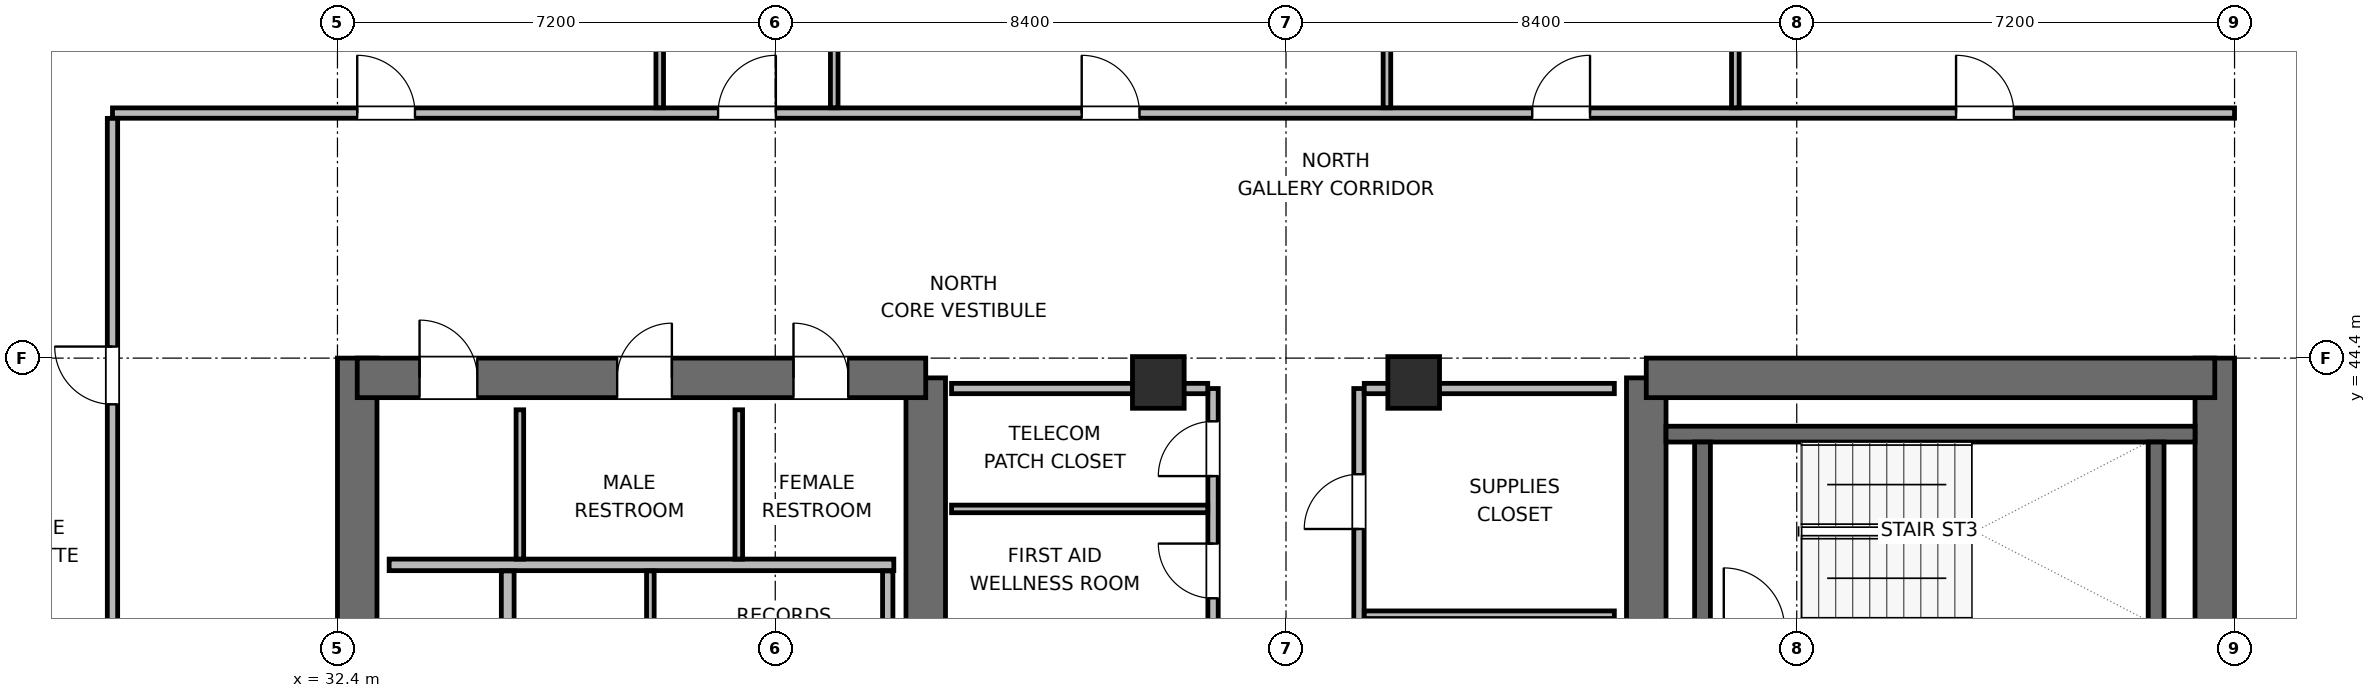
"""IFC4 building model, lengths in metres.
Left out: names, types, materials, properties, quantities, classifications, styles, units other than length and angle.
Written with IfcOpenShell. Run it as: python <this file> out.ifc"""

import sys

from ifc_helpers import new_model, si_unit, direction, frame, frame_2d, origin, origin_2d, place, context, subcontext, project, spatial, rectangle, extrude, element, fill, save


model = new_model("IFC4")
c1 = context("Model", 3, precision=1e-05, world=origin(), true_north=direction((0.0, 1.0)))
c2 = subcontext(c1, "Body", "Model", "MODEL_VIEW")
j1 = project(units=[si_unit("LENGTHUNIT", "METRE"), si_unit("PLANEANGLEUNIT", "RADIAN")], contexts=[c1])
p1 = place(None, origin())
s1 = spatial("IfcSite", under=j1, at=p1, CompositionType="ELEMENT")
p2 = place(p1, origin())
s2 = spatial("IfcBuilding", under=s1, at=p2, CompositionType="ELEMENT")
p3 = place(p2, frame((0.0, 0.0, 223.2)))
s3 = spatial("IfcBuildingStorey", under=s2, at=p3, CompositionType="ELEMENT", Elevation=223.2)
p4 = place(p3, frame((32.725, 27.6, 0.0), z_axis=(0.0, 0.0, 1.0), x_axis=(0.0, 1.0, 0.0)))
e1 = element("IfcWall", 1, at=p4, inside=s3, PredefinedType="SHEAR", context=c2, shape_type="SweptSolid", body=[
    extrude(rectangle(XDim=16.8, YDim=0.65, at=frame_2d((8.4, 0.0))), origin(), (0.0, 0.0, 1.0), 3.9),
])
p5 = place(p3, frame((42.075, 37.8, 0.0), z_axis=(0.0, 0.0, 1.0), x_axis=(0.0, 1.0, 0.0)))
e2 = element("IfcWall", 2, at=p5, inside=s3, PredefinedType="SHEAR", context=c2, shape_type="SweptSolid", body=[
    extrude(rectangle(XDim=6.275, YDim=0.65, at=frame_2d((3.137, 0.0))), origin(), (0.0, 0.0, 1.0), 3.9),
])
p6 = place(p3, frame((32.725, 44.075, 0.0), z_axis=(0.0, 0.0, 1.0), x_axis=(1.0, 0.0, 0.0)))
e3 = element("IfcWall", 3, at=p6, inside=s3, PredefinedType="SHEAR", context=c2, shape_type="SweptSolid", body=[
    extrude(rectangle(XDim=9.35, YDim=0.65, at=frame_2d((4.675, 0.0))), origin(), (0.0, 0.0, 1.0), 3.9),
])
p7 = place(p6, frame((1.025, 0.0, 0.0)))
e4 = element("IfcOpeningElement", 4, at=p7, cuts=e3, PredefinedType="OPENING", context=c2, shape_type="SweptSolid", body=[
    extrude(rectangle(XDim=0.95, YDim=2.04, at=frame_2d((0.475, 1.02))), frame((0.0, 0.335, 0.0), z_axis=(0.0, -1.0, 0.0), x_axis=(1.0, 0.0, 0.0)), (0.0, 0.0, 1.0), 0.67),
])
p8 = place(p6, frame((4.275, 0.0, 0.0)))
e5 = element("IfcOpeningElement", 5, at=p8, cuts=e3, PredefinedType="OPENING", context=c2, shape_type="SweptSolid", body=[
    extrude(rectangle(XDim=0.9, YDim=2.02, at=frame_2d((0.45, 1.01))), frame((0.0, 0.335, 0.0), z_axis=(0.0, -1.0, 0.0), x_axis=(1.0, 0.0, 0.0)), (0.0, 0.0, 1.0), 0.67),
])
p9 = place(p6, frame((7.175, 0.0, 0.0)))
e6 = element("IfcOpeningElement", 6, at=p9, cuts=e3, PredefinedType="OPENING", context=c2, shape_type="SweptSolid", body=[
    extrude(rectangle(XDim=0.9, YDim=2.02, at=frame_2d((0.45, 1.01))), frame((0.0, 0.335, 0.0), z_axis=(0.0, -1.0, 0.0), x_axis=(1.0, 0.0, 0.0)), (0.0, 0.0, 1.0), 0.67),
])
p10 = place(p3, frame((53.925, 38.0, 0.0), z_axis=(0.0, 0.0, 1.0), x_axis=(0.0, 1.0, 0.0)))
e7 = element("IfcWall", 7, at=p10, inside=s3, PredefinedType="SHEAR", context=c2, shape_type="SweptSolid", body=[
    extrude(rectangle(XDim=6.075, YDim=0.65, at=frame_2d((3.038, 0.0))), origin(), (0.0, 0.0, 1.0), 3.9),
])
p11 = place(p3, frame((63.275, 27.6, 0.0), z_axis=(0.0, 0.0, 1.0), x_axis=(0.0, 1.0, 0.0)))
e8 = element("IfcWall", 8, at=p11, inside=s3, PredefinedType="SHEAR", context=c2, shape_type="SweptSolid", body=[
    extrude(rectangle(XDim=16.8, YDim=0.65, at=frame_2d((8.4, 0.0))), origin(), (0.0, 0.0, 1.0), 3.9),
])
p12 = place(p3, frame((53.925, 44.075, 0.0), z_axis=(0.0, 0.0, 1.0), x_axis=(1.0, 0.0, 0.0)))
e9 = element("IfcWall", 9, at=p12, inside=s3, PredefinedType="SHEAR", context=c2, shape_type="SweptSolid", body=[
    extrude(rectangle(XDim=9.35, YDim=0.65, at=frame_2d((4.675, 0.0))), origin(), (0.0, 0.0, 1.0), 3.9),
])
p13 = place(p3, frame((54.25, 43.15, 0.0), z_axis=(0.0, 0.0, 1.0), x_axis=(1.0, 0.0, 0.0)))
e10 = element("IfcWall", 10, at=p13, inside=s3, PredefinedType="SHEAR", context=c2, shape_type="SweptSolid", body=[
    extrude(rectangle(XDim=8.7, YDim=0.26, at=frame_2d((4.35, 0.0))), origin(), (0.0, 0.0, 1.0), 3.9),
])
for number, where, z_axis, x_axis in (
    (11, (54.85, 40.08, 0.0), (0.0, 0.0, 1.0), (0.0, 1.0, 0.0)),
    (12, (62.31, 40.08, 0.0), (0.0, 0.0, 1.0), (0.0, 1.0, 0.0)),
):
    element("IfcWall", number, at=place(p3, frame(where, z_axis=z_axis, x_axis=x_axis)), inside=s3, PredefinedType="SHEAR", context=c2, shape_type="SweptSolid", body=[
        extrude(rectangle(XDim=2.94, YDim=0.26, at=frame_2d((1.47, 0.0))), origin(), (0.0, 0.0, 1.0), 3.9),
    ])
for number, where, z_axis, x_axis in (
    (13, (45.9, 44.0, 0.0), (0.0, 0.0, 1.0), (1.0, 0.0, 0.0)),
    (14, (50.1, 44.0, 0.0), (0.0, 0.0, 1.0), (1.0, 0.0, 0.0)),
):
    element("IfcColumn", number, at=place(p3, frame(where, z_axis=z_axis, x_axis=x_axis)), inside=s3, PredefinedType="COLUMN", context=c2, shape_type="SweptSolid", body=[
        extrude(rectangle(XDim=0.85, YDim=0.85, at=origin_2d()), origin(), (0.0, 0.0, 1.0), 3.9),
    ])
p14 = place(p3, frame((33.25, 41.0, 0.0), z_axis=(0.0, 0.0, 1.0), x_axis=(1.0, 0.0, 0.0)))
e15 = element("IfcWall", 15, at=p14, inside=s3, PredefinedType="PLUMBINGWALL", context=c2, shape_type="SweptSolid", body=[
    extrude(rectangle(XDim=8.3, YDim=0.19, at=frame_2d((4.15, 0.0))), origin(), (0.0, 0.0, 1.0), 3.68),
])
for number, where, z_axis, x_axis in (
    (16, (35.4, 41.095, 0.0), (0.0, 0.0, 1.0), (0.0, 1.0, 0.0)),
    (17, (39.0, 41.095, 0.0), (0.0, 0.0, 1.0), (0.0, 1.0, 0.0)),
):
    element("IfcWall", number, at=place(p3, frame(where, z_axis=z_axis, x_axis=x_axis)), inside=s3, PredefinedType="PARTITIONING", context=c2, shape_type="SweptSolid", body=[
        extrude(rectangle(XDim=2.455, YDim=0.125, at=frame_2d((1.228, 0.0))), origin(), (0.0, 0.0, 1.0), 3.68),
    ])
p15 = place(p3, frame((35.2, 39.58, 0.0), z_axis=(0.0, 0.0, 1.0), x_axis=(0.0, 1.0, 0.0)))
e18 = element("IfcWall", 18, at=p15, inside=s3, PredefinedType="PARTITIONING", context=c2, shape_type="SweptSolid", body=[
    extrude(rectangle(XDim=1.32, YDim=0.21, at=frame_2d((0.66, 0.0))), origin(), (0.0, 0.0, 1.0), 3.68),
])
p16 = place(p3, frame((41.45, 38.087, 0.0), z_axis=(0.0, 0.0, 1.0), x_axis=(0.0, 1.0, 0.0)))
e19 = element("IfcWall", 19, at=p16, inside=s3, PredefinedType="PARTITIONING", context=c2, shape_type="SweptSolid", body=[
    extrude(rectangle(XDim=2.813, YDim=0.17, at=frame_2d((1.406, 0.0))), origin(), (0.0, 0.0, 1.0), 3.68),
])
p17 = place(p3, frame((37.546, 38.087, 0.0), z_axis=(0.0, 0.0, 1.0), x_axis=(0.0, 1.0, 0.0)))
e20 = element("IfcWall", 20, at=p17, inside=s3, PredefinedType="PARTITIONING", context=c2, shape_type="SweptSolid", body=[
    extrude(rectangle(XDim=2.813, YDim=0.125, at=frame_2d((1.406, 0.0))), origin(), (0.0, 0.0, 1.0), 3.68),
])
p18 = place(p3, frame((46.8, 37.9, 0.0), z_axis=(0.0, 0.0, 1.0), x_axis=(0.0, 1.0, 0.0)))
e21 = element("IfcWall", 21, at=p18, inside=s3, PredefinedType="PARTITIONING", context=c2, shape_type="SweptSolid", body=[
    extrude(rectangle(XDim=6.0, YDim=0.17, at=frame_2d((3.0, 0.0))), origin(), (0.0, 0.0, 1.0), 3.68),
])
p19 = place(p18, frame((0.54, 0.0, 0.0)))
e22 = element("IfcOpeningElement", 22, at=p19, cuts=e21, PredefinedType="OPENING", context=c2, shape_type="SweptSolid", body=[
    extrude(rectangle(XDim=0.9, YDim=2.02, at=frame_2d((0.45, 1.01))), frame((0.0, 0.095, 0.0), z_axis=(0.0, -1.0, 0.0), x_axis=(1.0, 0.0, 0.0)), (0.0, 0.0, 1.0), 0.19),
])
p20 = place(p18, frame((2.55, 0.0, 0.0)))
e23 = element("IfcOpeningElement", 23, at=p20, cuts=e21, PredefinedType="OPENING", context=c2, shape_type="SweptSolid", body=[
    extrude(rectangle(XDim=0.9, YDim=2.02, at=frame_2d((0.45, 1.01))), frame((0.0, 0.095, 0.0), z_axis=(0.0, -1.0, 0.0), x_axis=(1.0, 0.0, 0.0)), (0.0, 0.0, 1.0), 0.19),
])
p21 = place(p18, frame((4.56, 0.0, 0.0)))
e24 = element("IfcOpeningElement", 24, at=p21, cuts=e21, PredefinedType="OPENING", context=c2, shape_type="SweptSolid", body=[
    extrude(rectangle(XDim=0.9, YDim=2.02, at=frame_2d((0.45, 1.01))), frame((0.0, 0.095, 0.0), z_axis=(0.0, -1.0, 0.0), x_axis=(1.0, 0.0, 0.0)), (0.0, 0.0, 1.0), 0.19),
])
p22 = place(p3, frame((42.5, 43.9, 0.0), z_axis=(0.0, 0.0, 1.0), x_axis=(1.0, 0.0, 0.0)))
e25 = element("IfcWall", 25, at=p22, inside=s3, PredefinedType="PARTITIONING", context=c2, shape_type="SweptSolid", body=[
    extrude(rectangle(XDim=4.213, YDim=0.17, at=frame_2d((2.106, 0.0))), origin(), (0.0, 0.0, 1.0), 2.765),
])
p23 = place(p3, frame((42.5, 41.92, 0.0), z_axis=(0.0, 0.0, 1.0), x_axis=(1.0, 0.0, 0.0)))
e26 = element("IfcWall", 26, at=p23, inside=s3, PredefinedType="PARTITIONING", context=c2, shape_type="SweptSolid", body=[
    extrude(rectangle(XDim=4.213, YDim=0.125, at=frame_2d((2.106, 0.0))), origin(), (0.0, 0.0, 1.0), 3.68),
])
p24 = place(p3, frame((49.2, 37.9, 0.0), z_axis=(0.0, 0.0, 1.0), x_axis=(0.0, 1.0, 0.0)))
e27 = element("IfcWall", 27, at=p24, inside=s3, PredefinedType="PARTITIONING", context=c2, shape_type="SweptSolid", body=[
    extrude(rectangle(XDim=6.0, YDim=0.17, at=frame_2d((3.0, 0.0))), origin(), (0.0, 0.0, 1.0), 3.68),
])
p25 = place(p24, frame((0.69, 0.0, 0.0)))
e28 = element("IfcOpeningElement", 28, at=p25, cuts=e27, PredefinedType="OPENING", context=c2, shape_type="SweptSolid", body=[
    extrude(rectangle(XDim=0.9, YDim=2.02, at=frame_2d((0.45, 1.01))), frame((0.0, 0.095, 0.0), z_axis=(0.0, -1.0, 0.0), x_axis=(1.0, 0.0, 0.0)), (0.0, 0.0, 1.0), 0.19),
])
p26 = place(p24, frame((3.69, 0.0, 0.0)))
e29 = element("IfcOpeningElement", 29, at=p26, cuts=e27, PredefinedType="OPENING", context=c2, shape_type="SweptSolid", body=[
    extrude(rectangle(XDim=0.9, YDim=2.02, at=frame_2d((0.45, 1.01))), frame((0.0, 0.095, 0.0), z_axis=(0.0, -1.0, 0.0), x_axis=(1.0, 0.0, 0.0)), (0.0, 0.0, 1.0), 0.19),
])
p27 = place(p3, frame((49.287, 43.9, 0.0), z_axis=(0.0, 0.0, 1.0), x_axis=(1.0, 0.0, 0.0)))
e30 = element("IfcWall", 30, at=p27, inside=s3, PredefinedType="PARTITIONING", context=c2, shape_type="SweptSolid", body=[
    extrude(rectangle(XDim=4.113, YDim=0.17, at=frame_2d((2.056, 0.0))), origin(), (0.0, 0.0, 1.0), 2.765),
])
p28 = place(p3, frame((49.287, 40.18, 0.0), z_axis=(0.0, 0.0, 1.0), x_axis=(1.0, 0.0, 0.0)))
e31 = element("IfcWall", 31, at=p28, inside=s3, PredefinedType="PARTITIONING", context=c2, shape_type="SweptSolid", body=[
    extrude(rectangle(XDim=4.113, YDim=0.125, at=frame_2d((2.056, 0.0))), origin(), (0.0, 0.0, 1.0), 3.68),
])
p29 = place(p3, frame((28.7, 48.43, 0.0), z_axis=(0.0, 0.0, 1.0), x_axis=(1.0, 0.0, 0.0)))
e32 = element("IfcWall", 32, at=p29, inside=s3, PredefinedType="PARTITIONING", context=c2, shape_type="SweptSolid", body=[
    extrude(rectangle(XDim=34.9, YDim=0.17, at=frame_2d((17.45, 0.0))), origin(), (0.0, 0.0, 1.0), 3.68),
])
p30 = place(p29, frame((4.025, 0.0, 0.0)))
e33 = element("IfcOpeningElement", 33, at=p30, cuts=e32, PredefinedType="OPENING", context=c2, shape_type="SweptSolid", body=[
    extrude(rectangle(XDim=0.95, YDim=2.04, at=frame_2d((0.475, 1.02))), frame((0.0, 0.095, 0.0), z_axis=(0.0, -1.0, 0.0), x_axis=(1.0, 0.0, 0.0)), (0.0, 0.0, 1.0), 0.19),
])
p31 = place(p29, frame((9.96, 0.0, 0.0)))
e34 = element("IfcOpeningElement", 34, at=p31, cuts=e32, PredefinedType="OPENING", context=c2, shape_type="SweptSolid", body=[
    extrude(rectangle(XDim=0.95, YDim=2.04, at=frame_2d((0.475, 1.02))), frame((0.0, 0.095, 0.0), z_axis=(0.0, -1.0, 0.0), x_axis=(1.0, 0.0, 0.0)), (0.0, 0.0, 1.0), 0.19),
])
p32 = place(p29, frame((15.94, 0.0, 0.0)))
e35 = element("IfcOpeningElement", 35, at=p32, cuts=e32, PredefinedType="OPENING", context=c2, shape_type="SweptSolid", body=[
    extrude(rectangle(XDim=0.95, YDim=2.04, at=frame_2d((0.475, 1.02))), frame((0.0, 0.095, 0.0), z_axis=(0.0, -1.0, 0.0), x_axis=(1.0, 0.0, 0.0)), (0.0, 0.0, 1.0), 0.19),
])
p33 = place(p29, frame((23.35, 0.0, 0.0)))
e36 = element("IfcOpeningElement", 36, at=p33, cuts=e32, PredefinedType="OPENING", context=c2, shape_type="SweptSolid", body=[
    extrude(rectangle(XDim=0.95, YDim=2.04, at=frame_2d((0.475, 1.02))), frame((0.0, 0.095, 0.0), z_axis=(0.0, -1.0, 0.0), x_axis=(1.0, 0.0, 0.0)), (0.0, 0.0, 1.0), 0.19),
])
p34 = place(p29, frame((30.32, 0.0, 0.0)))
e37 = element("IfcOpeningElement", 37, at=p34, cuts=e32, PredefinedType="OPENING", context=c2, shape_type="SweptSolid", body=[
    extrude(rectangle(XDim=0.95, YDim=2.04, at=frame_2d((0.475, 1.02))), frame((0.0, 0.095, 0.0), z_axis=(0.0, -1.0, 0.0), x_axis=(1.0, 0.0, 0.0)), (0.0, 0.0, 1.0), 0.19),
])
p35 = place(p3, frame((28.7, 23.657, 0.0), z_axis=(0.0, 0.0, 1.0), x_axis=(0.0, 1.0, 0.0)))
e38 = element("IfcWall", 38, at=p35, inside=s3, PredefinedType="PARTITIONING", context=c2, shape_type="SweptSolid", body=[
    extrude(rectangle(XDim=24.686, YDim=0.17, at=frame_2d((12.343, 0.0))), origin(), (0.0, 0.0, 1.0), 3.68),
])
p36 = place(p35, frame((4.353, 0.0, 0.0)))
e39 = element("IfcOpeningElement", 39, at=p36, cuts=e38, PredefinedType="OPENING", context=c2, shape_type="SweptSolid", body=[
    extrude(rectangle(XDim=0.95, YDim=2.04, at=frame_2d((0.475, 1.02))), frame((0.0, 0.095, 0.0), z_axis=(0.0, -1.0, 0.0), x_axis=(1.0, 0.0, 0.0)), (0.0, 0.0, 1.0), 0.19),
])
p37 = place(p35, frame((12.468, 0.0, 0.0)))
e40 = element("IfcOpeningElement", 40, at=p37, cuts=e38, PredefinedType="OPENING", context=c2, shape_type="SweptSolid", body=[
    extrude(rectangle(XDim=0.95, YDim=2.04, at=frame_2d((0.475, 1.02))), frame((0.0, 0.095, 0.0), z_axis=(0.0, -1.0, 0.0), x_axis=(1.0, 0.0, 0.0)), (0.0, 0.0, 1.0), 0.19),
])
p38 = place(p35, frame((19.983, 0.0, 0.0)))
e41 = element("IfcOpeningElement", 41, at=p38, cuts=e38, PredefinedType="OPENING", context=c2, shape_type="SweptSolid", body=[
    extrude(rectangle(XDim=0.95, YDim=2.04, at=frame_2d((0.475, 1.02))), frame((0.0, 0.095, 0.0), z_axis=(0.0, -1.0, 0.0), x_axis=(1.0, 0.0, 0.0)), (0.0, 0.0, 1.0), 0.19),
])
p39 = place(p3, frame((37.7, 48.517, 0.0), z_axis=(0.0, 0.0, 1.0), x_axis=(0.0, 1.0, 0.0)))
e42 = element("IfcWall", 42, at=p39, inside=s3, PredefinedType="PARTITIONING", context=c2, shape_type="SweptSolid", body=[
    extrude(rectangle(XDim=13.648, YDim=0.125, at=frame_2d((6.824, 0.0))), origin(), (0.0, 0.0, 1.0), 3.68),
])
p40 = place(p3, frame((40.57, 48.517, 0.0), z_axis=(0.0, 0.0, 1.0), x_axis=(0.0, 1.0, 0.0)))
e43 = element("IfcWall", 43, at=p40, inside=s3, PredefinedType="PARTITIONING", context=c2, shape_type="SweptSolid", body=[
    extrude(rectangle(XDim=13.648, YDim=0.125, at=frame_2d((6.824, 0.0))), origin(), (0.0, 0.0, 1.0), 3.043),
])
p41 = place(p3, frame((49.66, 48.517, 0.0), z_axis=(0.0, 0.0, 1.0), x_axis=(0.0, 1.0, 0.0)))
e44 = element("IfcWall", 44, at=p41, inside=s3, PredefinedType="PARTITIONING", context=c2, shape_type="SweptSolid", body=[
    extrude(rectangle(XDim=10.128, YDim=0.125, at=frame_2d((5.064, 0.0))), origin(), (0.0, 0.0, 1.0), 3.68),
])
p42 = place(p3, frame((55.39, 48.517, 0.0), z_axis=(0.0, 0.0, 1.0), x_axis=(0.0, 1.0, 0.0)))
e45 = element("IfcWall", 45, at=p42, inside=s3, PredefinedType="PARTITIONING", context=c2, shape_type="SweptSolid", body=[
    extrude(rectangle(XDim=13.608, YDim=0.125, at=frame_2d((6.804, 0.0))), origin(), (0.0, 0.0, 1.0), 3.043),
])
p43 = place(p7, origin())
e46 = element("IfcDoor", 46, at=p43, inside=s3, OperationType="SINGLE_SWING_LEFT", PredefinedType="DOOR", context=c2, shape_type="SweptSolid", body=[
    extrude(rectangle(XDim=0.95, YDim=2.04, at=frame_2d((0.475, 1.02))), frame((0.0, 0.025, 0.0), z_axis=(0.0, -1.0, 0.0), x_axis=(1.0, 0.0, 0.0)), (0.0, 0.0, 1.0), 0.05),
])
fill(e4, e46)
p44 = place(p8, origin())
e47 = element("IfcDoor", 47, at=p44, inside=s3, OperationType="SINGLE_SWING_RIGHT", PredefinedType="DOOR", context=c2, shape_type="SweptSolid", body=[
    extrude(rectangle(XDim=0.9, YDim=2.02, at=frame_2d((0.45, 1.01))), frame((0.0, 0.025, 0.0), z_axis=(0.0, -1.0, 0.0), x_axis=(1.0, 0.0, 0.0)), (0.0, 0.0, 1.0), 0.05),
])
fill(e5, e47)
p45 = place(p9, origin())
e48 = element("IfcDoor", 48, at=p45, inside=s3, OperationType="SINGLE_SWING_LEFT", PredefinedType="DOOR", context=c2, shape_type="SweptSolid", body=[
    extrude(rectangle(XDim=0.9, YDim=2.02, at=frame_2d((0.45, 1.01))), frame((0.0, 0.025, 0.0), z_axis=(0.0, -1.0, 0.0), x_axis=(1.0, 0.0, 0.0)), (0.0, 0.0, 1.0), 0.05),
])
fill(e6, e48)
p46 = place(p20, origin())
e49 = element("IfcDoor", 49, at=p46, inside=s3, OperationType="SINGLE_SWING_RIGHT", PredefinedType="DOOR", context=c2, shape_type="SweptSolid", body=[
    extrude(rectangle(XDim=0.9, YDim=2.02, at=frame_2d((0.45, 1.01))), frame((0.0, 0.025, 0.0), z_axis=(0.0, -1.0, 0.0), x_axis=(1.0, 0.0, 0.0)), (0.0, 0.0, 1.0), 0.05),
])
fill(e23, e49)
p47 = place(p21, origin())
e50 = element("IfcDoor", 50, at=p47, inside=s3, OperationType="SINGLE_SWING_LEFT", PredefinedType="DOOR", context=c2, shape_type="SweptSolid", body=[
    extrude(rectangle(XDim=0.9, YDim=2.02, at=frame_2d((0.45, 1.01))), frame((0.0, 0.025, 0.0), z_axis=(0.0, -1.0, 0.0), x_axis=(1.0, 0.0, 0.0)), (0.0, 0.0, 1.0), 0.05),
])
fill(e24, e50)
p48 = place(p26, origin())
e51 = element("IfcDoor", 51, at=p48, inside=s3, OperationType="SINGLE_SWING_LEFT", PredefinedType="DOOR", context=c2, shape_type="SweptSolid", body=[
    extrude(rectangle(XDim=0.9, YDim=2.02, at=frame_2d((0.45, 1.01))), frame((0.0, 0.025, 0.0), z_axis=(0.0, -1.0, 0.0), x_axis=(1.0, 0.0, 0.0)), (0.0, 0.0, 1.0), 0.05),
])
fill(e29, e51)
p49 = place(p30, origin())
e52 = element("IfcDoor", 52, at=p49, inside=s3, OperationType="SINGLE_SWING_LEFT", PredefinedType="DOOR", context=c2, shape_type="SweptSolid", body=[
    extrude(rectangle(XDim=0.95, YDim=2.04, at=frame_2d((0.475, 1.02))), frame((0.0, 0.025, 0.0), z_axis=(0.0, -1.0, 0.0), x_axis=(1.0, 0.0, 0.0)), (0.0, 0.0, 1.0), 0.05),
])
fill(e33, e52)
p50 = place(p31, origin())
e53 = element("IfcDoor", 53, at=p50, inside=s3, OperationType="SINGLE_SWING_RIGHT", PredefinedType="DOOR", context=c2, shape_type="SweptSolid", body=[
    extrude(rectangle(XDim=0.95, YDim=2.04, at=frame_2d((0.475, 1.02))), frame((0.0, 0.025, 0.0), z_axis=(0.0, -1.0, 0.0), x_axis=(1.0, 0.0, 0.0)), (0.0, 0.0, 1.0), 0.05),
])
fill(e34, e53)
p51 = place(p32, origin())
e54 = element("IfcDoor", 54, at=p51, inside=s3, OperationType="SINGLE_SWING_LEFT", PredefinedType="DOOR", context=c2, shape_type="SweptSolid", body=[
    extrude(rectangle(XDim=0.95, YDim=2.04, at=frame_2d((0.475, 1.02))), frame((0.0, 0.025, 0.0), z_axis=(0.0, -1.0, 0.0), x_axis=(1.0, 0.0, 0.0)), (0.0, 0.0, 1.0), 0.05),
])
fill(e35, e54)
p52 = place(p33, origin())
e55 = element("IfcDoor", 55, at=p52, inside=s3, OperationType="SINGLE_SWING_RIGHT", PredefinedType="DOOR", context=c2, shape_type="SweptSolid", body=[
    extrude(rectangle(XDim=0.95, YDim=2.04, at=frame_2d((0.475, 1.02))), frame((0.0, 0.025, 0.0), z_axis=(0.0, -1.0, 0.0), x_axis=(1.0, 0.0, 0.0)), (0.0, 0.0, 1.0), 0.05),
])
fill(e36, e55)
p53 = place(p34, origin())
e56 = element("IfcDoor", 56, at=p53, inside=s3, OperationType="SINGLE_SWING_LEFT", PredefinedType="DOOR", context=c2, shape_type="SweptSolid", body=[
    extrude(rectangle(XDim=0.95, YDim=2.04, at=frame_2d((0.475, 1.02))), frame((0.0, 0.025, 0.0), z_axis=(0.0, -1.0, 0.0), x_axis=(1.0, 0.0, 0.0)), (0.0, 0.0, 1.0), 0.05),
])
fill(e37, e56)
p54 = place(p38, origin())
e57 = element("IfcDoor", 57, at=p54, inside=s3, OperationType="SINGLE_SWING_RIGHT", PredefinedType="DOOR", context=c2, shape_type="SweptSolid", body=[
    extrude(rectangle(XDim=0.95, YDim=2.04, at=frame_2d((0.475, 1.02))), frame((0.0, 0.025, 0.0), z_axis=(0.0, -1.0, 0.0), x_axis=(1.0, 0.0, 0.0)), (0.0, 0.0, 1.0), 0.05),
])
fill(e41, e57)
save(model, sys.argv[1])
